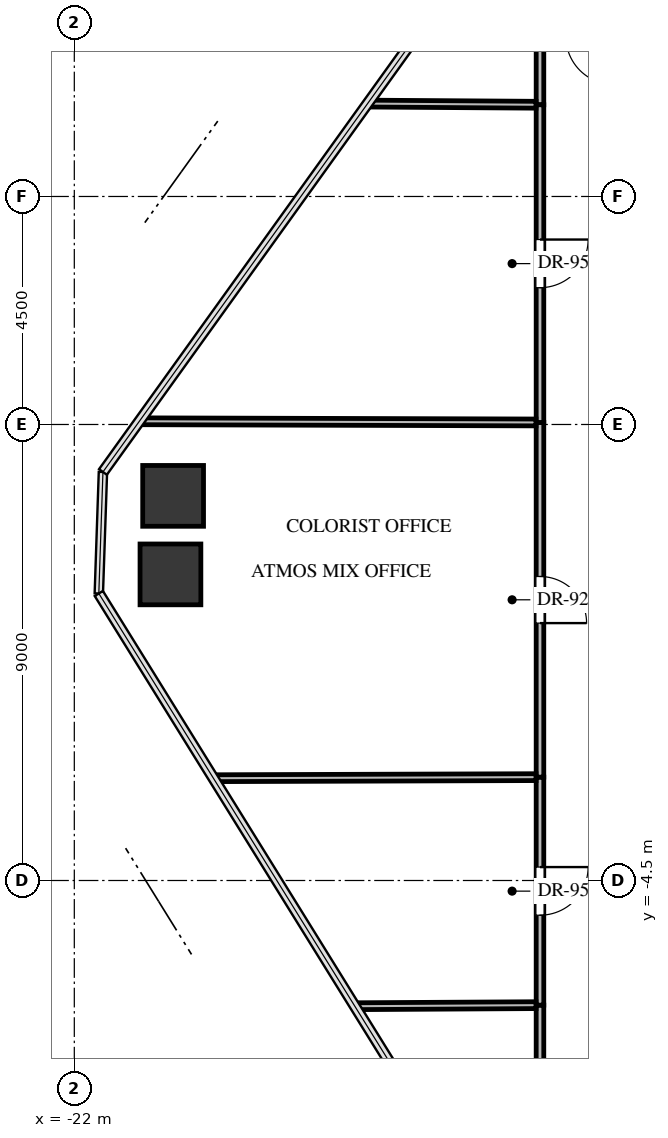
"""IFC4 building model, lengths in metres.
Left out: names, types, materials, properties, quantities, classifications, styles, units other than length and angle.
Written with IfcOpenShell. Run it as: python <this file> out.ifc"""

import sys

from ifc_helpers import new_model, si_unit, direction, frame, frame_2d, origin, origin_2d, place, context, subcontext, project, spatial, rectangle, extrude, source, transform, mapped, element, fill, save


model = new_model("IFC4")
c1 = context("Model", 3, precision=1e-05, world=origin(), true_north=direction((0.0, 1.0)))
c2 = subcontext(c1, "Body", "Model", "MODEL_VIEW")
j1 = project(units=[si_unit("LENGTHUNIT", "METRE"), si_unit("PLANEANGLEUNIT", "RADIAN")], contexts=[c1])
p1 = place(None, origin())
s1 = spatial("IfcSite", under=j1, at=p1, CompositionType="ELEMENT")
p2 = place(p1, origin())
s2 = spatial("IfcBuilding", under=s1, at=p2, CompositionType="ELEMENT")
p3 = place(p2, frame((0.0, 0.0, 107.4)))
s3 = spatial("IfcBuildingStorey", under=s2, at=p3, CompositionType="ELEMENT", Elevation=107.4)
m1 = source(origin(), c2, "Body", "SweptSolid", [
    extrude(rectangle(XDim=1.2, YDim=1.2, at=origin_2d()), origin(), (0.0, 0.0, 1.0), 3.3),
])
for number, where, z_axis, x_axis in (
    (1, (-20.103, 1.542, -0.24), (0.0, 0.0, 1.0), (1.0, 0.0, 0.0)),
    (2, (-20.05, 3.091, -0.24), (0.0, 0.0, 1.0), (1.0, 0.0, 0.0)),
):
    element("IfcColumn", number, at=place(p3, frame(where, z_axis=z_axis, x_axis=x_axis)), inside=s3, PredefinedType="COLUMN", context=c2, shape_type="MappedRepresentation", body=[
        mapped(m1, transform((0.0, 0.0, 0.0), x_axis=(1.0, 0.0, 0.0), y_axis=(0.0, 1.0, 0.0), z_axis=(0.0, 0.0, 1.0), scale=1.0)),
    ])
p4 = place(p3, frame((-12.81, 12.081, 0.0), z_axis=(0.0, 0.0, 1.0), x_axis=(0.0, -1.0, 0.0)))
e3 = element("IfcWall", 3, at=p4, inside=s3, PredefinedType="PARTITIONING", context=c2, shape_type="SweptSolid", body=[
    extrude(rectangle(XDim=1.271, YDim=0.15, at=frame_2d((0.635, 0.0))), origin(), (0.0, 0.0, 1.0), 3.045),
])
p5 = place(p3, frame((-12.81, -6.96, 0.0), z_axis=(0.0, 0.0, 1.0), x_axis=(0.0, -1.0, 0.0)))
e4 = element("IfcWall", 4, at=p5, inside=s3, PredefinedType="PARTITIONING", context=c2, shape_type="SweptSolid", body=[
    extrude(rectangle(XDim=3.93, YDim=0.15, at=frame_2d((1.965, 0.0))), origin(), (0.0, 0.0, 1.0), 2.38),
])
p6 = place(p5, frame((1.505, 0.0, 0.0)))
e5 = element("IfcOpeningElement", 5, at=p6, cuts=e4, PredefinedType="OPENING", context=c2, shape_type="SweptSolid", body=[
    extrude(rectangle(XDim=0.92, YDim=2.1, at=frame_2d((0.46, 1.05))), frame((0.0, 0.085, 0.0), z_axis=(0.0, -1.0, 0.0), x_axis=(1.0, 0.0, 0.0)), (0.0, 0.0, 1.0), 0.17),
])
p7 = place(p3, frame((-12.81, -2.46, 0.0), z_axis=(0.0, 0.0, 1.0), x_axis=(0.0, -1.0, 0.0)))
e6 = element("IfcWall", 6, at=p7, inside=s3, PredefinedType="PARTITIONING", context=c2, shape_type="SweptSolid", body=[
    extrude(rectangle(XDim=4.5, YDim=0.15, at=frame_2d((2.25, 0.0))), origin(), (0.0, 0.0, 1.0), 3.045),
])
p8 = place(p7, frame((1.775, 0.0, 0.0)))
e7 = element("IfcOpeningElement", 7, at=p8, cuts=e6, PredefinedType="OPENING", context=c2, shape_type="SweptSolid", body=[
    extrude(rectangle(XDim=0.95, YDim=2.1, at=frame_2d((0.475, 1.05))), frame((0.0, 0.085, 0.0), z_axis=(0.0, -1.0, 0.0), x_axis=(1.0, 0.0, 0.0)), (0.0, 0.0, 1.0), 0.17),
])
p9 = place(p3, frame((-12.81, 4.54, 0.0), z_axis=(0.0, 0.0, 1.0), x_axis=(0.0, -1.0, 0.0)))
e8 = element("IfcWall", 8, at=p9, inside=s3, PredefinedType="PARTITIONING", context=c2, shape_type="SweptSolid", body=[
    extrude(rectangle(XDim=7.0, YDim=0.15, at=frame_2d((3.5, 0.0))), origin(), (0.0, 0.0, 1.0), 2.212),
])
p10 = place(p9, frame((3.04, 0.0, 0.0)))
e9 = element("IfcOpeningElement", 9, at=p10, cuts=e8, PredefinedType="OPENING", context=c2, shape_type="SweptSolid", body=[
    extrude(rectangle(XDim=0.92, YDim=2.1, at=frame_2d((0.46, 1.05))), frame((0.0, 0.085, 0.0), z_axis=(0.0, -1.0, 0.0), x_axis=(1.0, 0.0, 0.0)), (0.0, 0.0, 1.0), 0.17),
])
p11 = place(p3, frame((-12.81, 10.81, 0.0), z_axis=(0.0, 0.0, 1.0), x_axis=(0.0, -1.0, 0.0)))
e10 = element("IfcWall", 10, at=p11, inside=s3, PredefinedType="PARTITIONING", context=c2, shape_type="SweptSolid", body=[
    extrude(rectangle(XDim=6.27, YDim=0.15, at=frame_2d((3.135, 0.0))), origin(), (0.0, 0.0, 1.0), 3.045),
])
p12 = place(p11, frame((2.66, 0.0, 0.0)))
e11 = element("IfcOpeningElement", 11, at=p12, cuts=e10, PredefinedType="OPENING", context=c2, shape_type="SweptSolid", body=[
    extrude(rectangle(XDim=0.95, YDim=2.1, at=frame_2d((0.475, 1.05))), frame((0.0, 0.085, 0.0), z_axis=(0.0, -1.0, 0.0), x_axis=(1.0, 0.0, 0.0)), (0.0, 0.0, 1.0), 0.17),
])
p13 = place(p3, frame((-12.889, 10.811, 0.0), z_axis=(0.0, 0.0, 1.0), x_axis=(-0.999976657862, 0.006832549348, 0.0)))
e12 = element("IfcWall", 12, at=p13, inside=s3, PredefinedType="PARTITIONING", context=c2, shape_type="SweptSolid", body=[
    extrude(rectangle(XDim=3.323, YDim=0.135, at=frame_2d((1.662, 0.0))), origin(), (0.0, 0.0, 1.0), 2.38),
])
p14 = place(p3, frame((-16.464, -6.981, 0.0), z_axis=(0.0, 0.0, 1.0), x_axis=(0.99998315245, 0.005804723619, 0.0)))
e13 = element("IfcWall", 13, at=p14, inside=s3, PredefinedType="PARTITIONING", context=c2, shape_type="SweptSolid", body=[
    extrude(rectangle(XDim=3.575, YDim=0.135, at=frame_2d((1.788, 0.0))), origin(), (0.0, 0.0, 1.0), 2.38),
])
p15 = place(p3, frame((-19.255, -2.481, 0.0), z_axis=(0.0, 0.0, 1.0), x_axis=(0.999994561471, 0.003298033912, 0.0)))
e14 = element("IfcWall", 14, at=p15, inside=s3, PredefinedType="PARTITIONING", context=c2, shape_type="SweptSolid", body=[
    extrude(rectangle(XDim=6.366, YDim=0.135, at=frame_2d((3.183, 0.0))), origin(), (0.0, 0.0, 1.0), 2.38),
])
p16 = place(p3, frame((-20.716, 4.563, 0.0), z_axis=(0.0, 0.0, 1.0), x_axis=(0.999995701977, -0.002931898443, 0.0)))
e15 = element("IfcWall", 15, at=p16, inside=s3, PredefinedType="PARTITIONING", context=c2, shape_type="SweptSolid", body=[
    extrude(rectangle(XDim=7.827, YDim=0.135, at=frame_2d((3.914, 0.0))), origin(), (0.0, 0.0, 1.0), 2.38),
])
m2 = source(origin(), c2, "Body", "SweptSolid", [
    extrude(rectangle(XDim=0.95, YDim=2.1, at=frame_2d((0.475, 1.05))), frame((0.0, 0.025, 0.0), z_axis=(0.0, -1.0, 0.0), x_axis=(1.0, 0.0, 0.0)), (0.0, 0.0, 1.0), 0.05),
])
p17 = place(p8, origin())
e16 = element("IfcDoor", 16, at=p17, inside=s3, OperationType="SINGLE_SWING_LEFT", PredefinedType="DOOR", context=c2, shape_type="MappedRepresentation", body=[
    mapped(m2, transform((0.0, 0.0, 0.0), x_axis=(1.0, 0.0, 0.0), y_axis=(0.0, 1.0, 0.0), z_axis=(0.0, 0.0, 1.0), scale=1.0)),
])
fill(e7, e16)
m3 = source(origin(), c2, "Body", "SweptSolid", [
    extrude(rectangle(XDim=0.92, YDim=2.1, at=frame_2d((0.46, 1.05))), frame((0.0, 0.025, 0.0), z_axis=(0.0, -1.0, 0.0), x_axis=(1.0, 0.0, 0.0)), (0.0, 0.0, 1.0), 0.05),
])
p18 = place(p10, origin())
e17 = element("IfcDoor", 17, at=p18, inside=s3, OperationType="SINGLE_SWING_RIGHT", PredefinedType="DOOR", context=c2, shape_type="MappedRepresentation", body=[
    mapped(m3, transform((0.0, 0.0, 0.0), x_axis=(1.0, 0.0, 0.0), y_axis=(0.0, 1.0, 0.0), z_axis=(0.0, 0.0, 1.0), scale=1.0)),
])
fill(e9, e17)
p19 = place(p12, origin())
e18 = element("IfcDoor", 18, at=p19, inside=s3, OperationType="SINGLE_SWING_LEFT", PredefinedType="DOOR", context=c2, shape_type="MappedRepresentation", body=[
    mapped(m2, transform((0.0, 0.0, 0.0), x_axis=(1.0, 0.0, 0.0), y_axis=(0.0, 1.0, 0.0), z_axis=(0.0, 0.0, 1.0), scale=1.0)),
])
fill(e11, e18)
save(model, sys.argv[1])
